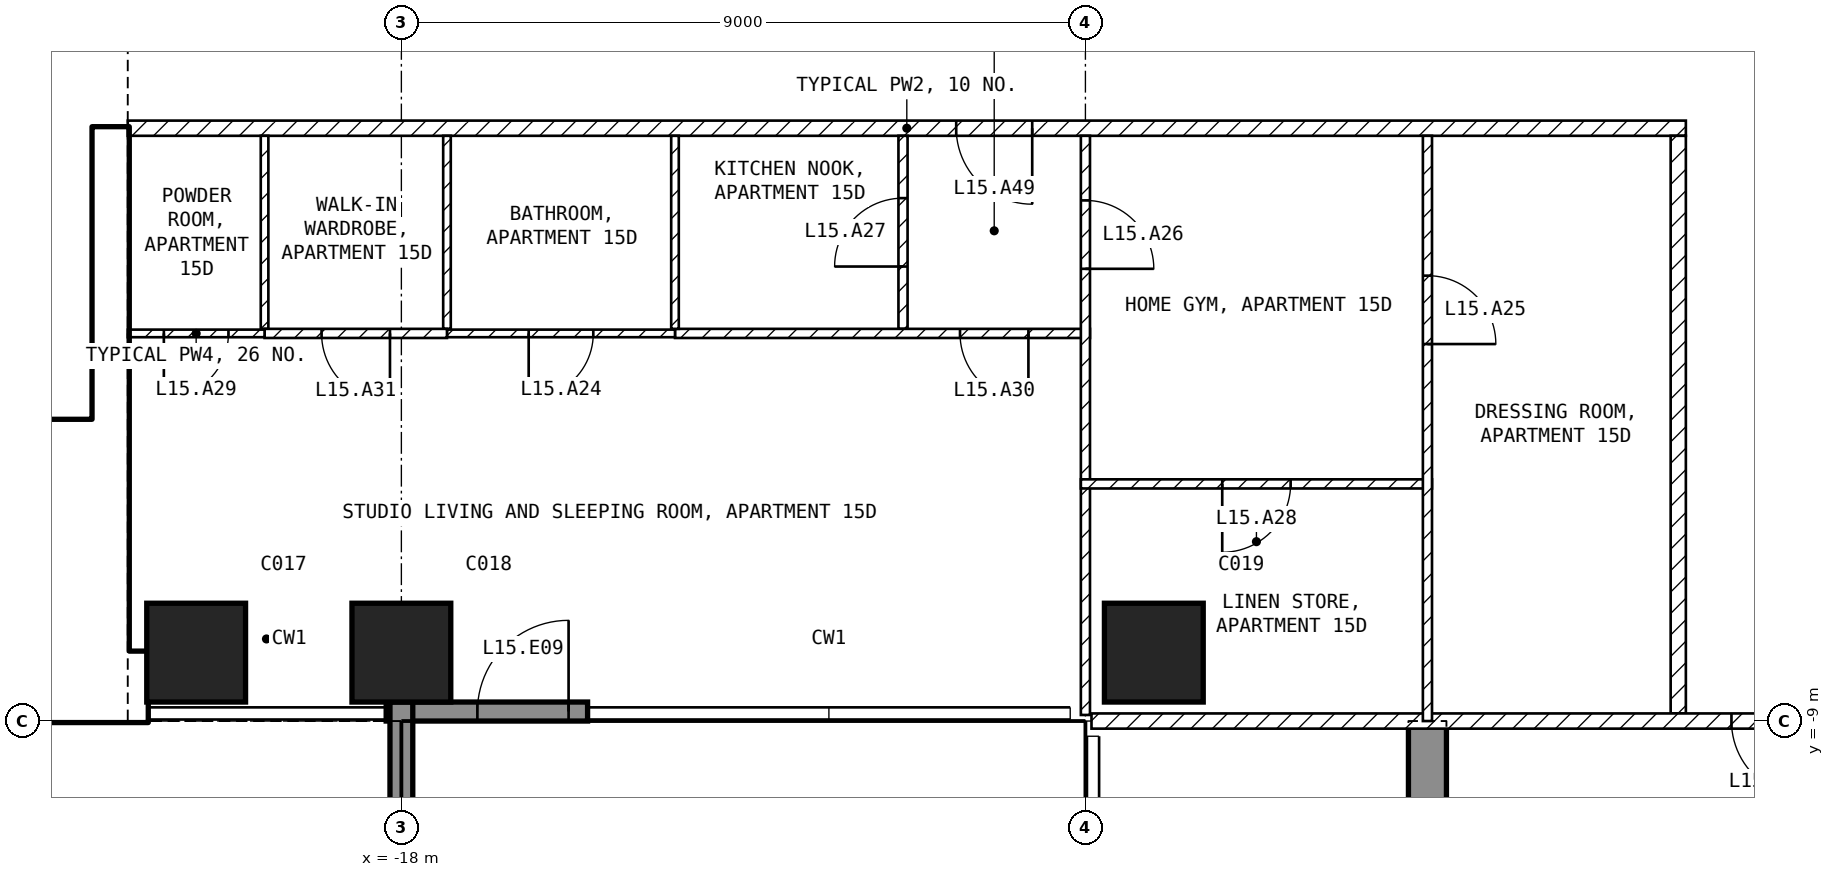
"""IFC4 building model, lengths in metres.
Left out: names, types, materials, properties, quantities, classifications, styles, units other than length and angle.
Written with IfcOpenShell. Run it as: python <this file> out.ifc"""

import sys

from ifc_helpers import new_model, si_unit, direction, frame, frame_2d, origin, origin_2d, place, context, subcontext, project, spatial, polyline, rectangle, outline, extrude, element, fill, save


model = new_model("IFC4")
c1 = context("Model", 3, precision=1e-05, world=origin(), true_north=direction((0.0, 1.0)))
c2 = subcontext(c1, "Body", "Model", "MODEL_VIEW")
j1 = project(units=[si_unit("LENGTHUNIT", "METRE"), si_unit("PLANEANGLEUNIT", "RADIAN")], contexts=[c1])
p1 = place(None, origin())
s1 = spatial("IfcSite", under=j1, at=p1, CompositionType="ELEMENT")
p2 = place(p1, origin())
s2 = spatial("IfcBuilding", under=s1, at=p2, CompositionType="ELEMENT")
p3 = place(p2, frame((0.0, 0.0, 71.5)))
s3 = spatial("IfcBuildingStorey", under=s2, at=p3, CompositionType="ELEMENT", Elevation=71.5)
for number, where, z_axis, x_axis in (
    (1, (-20.7, -8.1, -0.25), (0.0, 0.0, 1.0), (1.0, 0.0, 0.0)),
    (2, (-18.0, -8.1, -0.25), (0.0, 0.0, 1.0), (1.0, 0.0, 0.0)),
    (3, (-8.1, -8.1, -0.25), (0.0, 0.0, 1.0), (1.0, 0.0, 0.0)),
):
    element("IfcColumn", number, at=place(p3, frame(where, z_axis=z_axis, x_axis=x_axis)), inside=s3, PredefinedType="COLUMN", context=c2, shape_type="SweptSolid", body=[
        extrude(rectangle(XDim=1.3, YDim=1.3, at=origin_2d()), origin(), (0.0, 0.0, 1.0), 3.5),
    ])
p4 = place(p3, frame((-4.75, -25.45, -0.25), z_axis=(1.0, 0.0, 0.0), x_axis=(0.0, 1.0, 0.0)))
e4 = element("IfcWall", 4, at=p4, inside=s3, PredefinedType="SHEAR", context=c2, shape_type="SweptSolid", body=[
    extrude(outline(polyline([(0.0, 0.0), (4.15, 0.0), (4.15, 2.65), (6.55, 2.65), (6.55, 0.0), (11.95, 0.0), (11.95, 2.65), (14.35, 2.65), (14.35, 0.0), (16.45, 0.0), (16.45, 3.5), (0.0, 3.5), (0.0, 0.0)])), origin(), (0.0, 0.0, 1.0), 0.5),
])
p5 = place(p3, frame((-18.2, -8.875, 0.0), z_axis=(0.0, 0.0, 1.0), x_axis=(1.0, 0.0, 0.0)))
e5 = element("IfcWall", 5, at=p5, inside=s3, PredefinedType="SOLIDWALL", context=c2, shape_type="SweptSolid", body=[
    extrude(rectangle(XDim=2.65, YDim=0.25, at=frame_2d((1.325, 0.0))), origin(), (0.0, 0.0, 1.0), 3.25),
])
p6 = place(p5, frame((1.2, 0.0, 0.0)))
e6 = element("IfcOpeningElement", 6, at=p6, cuts=e5, PredefinedType="OPENING", context=c2, shape_type="SweptSolid", body=[
    extrude(rectangle(XDim=1.2, YDim=2.4, at=frame_2d((0.6, 1.2))), frame((0.0, 0.135, 0.0), z_axis=(0.0, -1.0, 0.0), x_axis=(1.0, 0.0, 0.0)), (0.0, 0.0, 1.0), 0.27),
])
p7 = place(p3, frame((-18.0, -8.75, 0.0), z_axis=(0.0, 0.0, 1.0), x_axis=(0.0, -1.0, 0.0)))
e7 = element("IfcWall", 7, at=p7, inside=s3, PredefinedType="SOLIDWALL", context=c2, shape_type="SweptSolid", body=[
    extrude(rectangle(XDim=2.95, YDim=0.3, at=frame_2d((1.475, 0.0))), origin(), (0.0, 0.0, 1.0), 3.25),
])
p8 = place(p3, frame((-32.4, -8.55, 0.0), z_axis=(0.0, 0.0, 1.0), x_axis=(1.0, 0.0, 0.0)))
e8 = element("IfcWall", 8, at=p8, inside=s3, PredefinedType="SHEAR", context=c2, shape_type="SweptSolid", body=[
    extrude(rectangle(XDim=11.05, YDim=0.9, at=frame_2d((5.525, 0.0))), origin(), (0.0, 0.0, 1.0), 3.25),
])
p9 = place(p3, frame((-21.825, -8.1, 0.0), z_axis=(0.0, 0.0, 1.0), x_axis=(0.0, 1.0, 0.0)))
e9 = element("IfcWall", 9, at=p9, inside=s3, PredefinedType="SHEAR", context=c2, shape_type="SweptSolid", body=[
    extrude(rectangle(XDim=6.9, YDim=0.45, at=frame_2d((3.45, 0.0))), origin(), (0.0, 0.0, 1.0), 3.25),
])
p10 = place(p3, frame((-28.35, -5.15, 0.0), z_axis=(0.0, 0.0, 1.0), x_axis=(1.0, 0.0, 0.0)))
e10 = element("IfcWall", 10, at=p10, inside=s3, PredefinedType="SOLIDWALL", context=c2, shape_type="SweptSolid", body=[
    extrude(rectangle(XDim=6.3, YDim=0.2, at=frame_2d((3.15, 0.0))), origin(), (0.0, 0.0, 1.0), 3.25),
])
p11 = place(p10, frame((5.1, 0.0, 0.0)))
e11 = element("IfcOpeningElement", 11, at=p11, cuts=e10, PredefinedType="OPENING", context=c2, shape_type="SweptSolid", body=[
    extrude(rectangle(XDim=1.0, YDim=2.1, at=frame_2d((0.5, 1.05))), frame((0.0, 0.11, 0.0), z_axis=(0.0, -1.0, 0.0), x_axis=(1.0, 0.0, 0.0)), (0.0, 0.0, 1.0), 0.22),
])
p12 = place(p3, frame((-1.1, -1.2, 0.0), z_axis=(0.0, 0.0, 1.0), x_axis=(-1.0, 0.0, 0.0)))
e12 = element("IfcWall", 12, at=p12, inside=s3, PredefinedType="PARTITIONING", context=c2, shape_type="SweptSolid", body=[
    extrude(rectangle(XDim=20.5, YDim=0.2, at=frame_2d((10.25, 0.0))), origin(), (0.0, 0.0, 1.0), 3.25),
])
p13 = place(p12, frame((8.6, 0.0, 0.0)))
e13 = element("IfcOpeningElement", 13, at=p13, cuts=e12, PredefinedType="OPENING", context=c2, shape_type="SweptSolid", body=[
    extrude(rectangle(XDim=1.0, YDim=2.1, at=frame_2d((0.5, 1.05))), frame((0.0, 0.11, 0.0), z_axis=(0.0, -1.0, 0.0), x_axis=(1.0, 0.0, 0.0)), (0.0, 0.0, 1.0), 0.22),
])
p14 = place(p3, frame((-1.2, -8.9, 0.0), z_axis=(0.0, 0.0, 1.0), x_axis=(0.0, 1.0, 0.0)))
e14 = element("IfcWall", 14, at=p14, inside=s3, PredefinedType="PARTITIONING", context=c2, shape_type="SweptSolid", body=[
    extrude(rectangle(XDim=7.6, YDim=0.2, at=frame_2d((3.8, 0.0))), origin(), (0.0, 0.0, 1.0), 3.25),
])
p15 = place(p3, frame((8.92, -9.0, 0.0), z_axis=(0.0, 0.0, 1.0), x_axis=(-1.0, 0.0, 0.0)))
e15 = element("IfcWall", 15, at=p15, inside=s3, PredefinedType="PARTITIONING", context=c2, shape_type="SweptSolid", body=[
    extrude(rectangle(XDim=17.84, YDim=0.2, at=frame_2d((8.92, 0.0))), origin(), (0.0, 0.0, 1.0), 3.25),
])
p16 = place(p15, frame((8.42, 0.0, 0.0)))
e16 = element("IfcOpeningElement", 16, at=p16, cuts=e15, PredefinedType="OPENING", context=c2, shape_type="SweptSolid", body=[
    extrude(rectangle(XDim=1.0, YDim=2.1, at=frame_2d((0.5, 1.05))), frame((0.0, 0.11, 0.0), z_axis=(0.0, -1.0, 0.0), x_axis=(1.0, 0.0, 0.0)), (0.0, 0.0, 1.0), 0.22),
])
p17 = place(p3, frame((-11.4, -3.84, 0.0), z_axis=(0.0, 0.0, 1.0), x_axis=(0.0, 1.0, 0.0)))
e17 = element("IfcWall", 17, at=p17, inside=s3, PredefinedType="PARTITIONING", context=c2, shape_type="SweptSolid", body=[
    extrude(rectangle(XDim=2.54, YDim=0.12, at=frame_2d((1.27, 0.0))), origin(), (0.0, 0.0, 1.0), 3.25),
])
p18 = place(p17, frame((0.82, 0.0, 0.0)))
e18 = element("IfcOpeningElement", 18, at=p18, cuts=e17, PredefinedType="OPENING", context=c2, shape_type="SweptSolid", body=[
    extrude(rectangle(XDim=0.9, YDim=2.1, at=frame_2d((0.45, 1.05))), frame((0.0, 0.07, 0.0), z_axis=(0.0, -1.0, 0.0), x_axis=(1.0, 0.0, 0.0)), (0.0, 0.0, 1.0), 0.14),
])
p19 = place(p3, frame((-8.94, -3.9, 0.0), z_axis=(0.0, 0.0, 1.0), x_axis=(-1.0, 0.0, 0.0)))
e19 = element("IfcWall", 19, at=p19, inside=s3, PredefinedType="PARTITIONING", context=c2, shape_type="SweptSolid", body=[
    extrude(rectangle(XDim=5.46, YDim=0.12, at=frame_2d((2.73, 0.0))), origin(), (0.0, 0.0, 1.0), 3.25),
])
p20 = place(p19, frame((0.81, 0.0, 0.0)))
e20 = element("IfcOpeningElement", 20, at=p20, cuts=e19, PredefinedType="OPENING", context=c2, shape_type="SweptSolid", body=[
    extrude(rectangle(XDim=0.9, YDim=2.1, at=frame_2d((0.45, 1.05))), frame((0.0, 0.07, 0.0), z_axis=(0.0, -1.0, 0.0), x_axis=(1.0, 0.0, 0.0)), (0.0, 0.0, 1.0), 0.14),
])
p21 = place(p3, frame((-9.0, -1.3, 0.0), z_axis=(0.0, 0.0, 1.0), x_axis=(0.0, -1.0, 0.0)))
e21 = element("IfcWall", 21, at=p21, inside=s3, PredefinedType="PARTITIONING", context=c2, shape_type="SweptSolid", body=[
    extrude(rectangle(XDim=7.62, YDim=0.12, at=frame_2d((3.81, 0.0))), origin(), (0.0, 0.0, 1.0), 3.25),
])
p22 = place(p21, frame((0.85, 0.0, 0.0)))
e22 = element("IfcOpeningElement", 22, at=p22, cuts=e21, PredefinedType="OPENING", context=c2, shape_type="SweptSolid", body=[
    extrude(rectangle(XDim=0.9, YDim=2.1, at=frame_2d((0.45, 1.05))), frame((0.0, 0.07, 0.0), z_axis=(0.0, -1.0, 0.0), x_axis=(1.0, 0.0, 0.0)), (0.0, 0.0, 1.0), 0.14),
])
for number, where, z_axis, x_axis in (
    (23, (-14.4, -3.84, 0.0), (0.0, 0.0, 1.0), (0.0, 1.0, 0.0)),
    (24, (-17.4, -3.84, 0.0), (0.0, 0.0, 1.0), (0.0, 1.0, 0.0)),
):
    element("IfcWall", number, at=place(p3, frame(where, z_axis=z_axis, x_axis=x_axis)), inside=s3, PredefinedType="PARTITIONING", context=c2, shape_type="SweptSolid", body=[
        extrude(rectangle(XDim=2.54, YDim=0.1, at=frame_2d((1.27, 0.0))), origin(), (0.0, 0.0, 1.0), 3.25),
    ])
p23 = place(p3, frame((-14.4, -3.9, 0.0), z_axis=(0.0, 0.0, 1.0), x_axis=(-1.0, 0.0, 0.0)))
e25 = element("IfcWall", 25, at=p23, inside=s3, PredefinedType="PARTITIONING", context=c2, shape_type="SweptSolid", body=[
    extrude(rectangle(XDim=3.0, YDim=0.1, at=frame_2d((1.5, 0.0))), origin(), (0.0, 0.0, 1.0), 3.25),
])
p24 = place(p23, frame((1.075, 0.0, 0.0)))
e26 = element("IfcOpeningElement", 26, at=p24, cuts=e25, PredefinedType="OPENING", context=c2, shape_type="SweptSolid", body=[
    extrude(rectangle(XDim=0.85, YDim=2.1, at=frame_2d((0.425, 1.05))), frame((0.0, 0.06, 0.0), z_axis=(0.0, -1.0, 0.0), x_axis=(1.0, 0.0, 0.0)), (0.0, 0.0, 1.0), 0.12),
])
p25 = place(p3, frame((-19.8, -3.84, 0.0), z_axis=(0.0, 0.0, 1.0), x_axis=(0.0, 1.0, 0.0)))
e27 = element("IfcWall", 27, at=p25, inside=s3, PredefinedType="PARTITIONING", context=c2, shape_type="SweptSolid", body=[
    extrude(rectangle(XDim=2.54, YDim=0.1, at=frame_2d((1.27, 0.0))), origin(), (0.0, 0.0, 1.0), 3.25),
])
p26 = place(p3, frame((-17.4, -3.9, 0.0), z_axis=(0.0, 0.0, 1.0), x_axis=(-1.0, 0.0, 0.0)))
e28 = element("IfcWall", 28, at=p26, inside=s3, PredefinedType="PARTITIONING", context=c2, shape_type="SweptSolid", body=[
    extrude(rectangle(XDim=2.4, YDim=0.12, at=frame_2d((1.2, 0.0))), origin(), (0.0, 0.0, 1.0), 3.25),
])
p27 = place(p26, frame((0.75, 0.0, 0.0)))
e29 = element("IfcOpeningElement", 29, at=p27, cuts=e28, PredefinedType="OPENING", context=c2, shape_type="SweptSolid", body=[
    extrude(rectangle(XDim=0.9, YDim=2.1, at=frame_2d((0.45, 1.05))), frame((0.0, 0.07, 0.0), z_axis=(0.0, -1.0, 0.0), x_axis=(1.0, 0.0, 0.0)), (0.0, 0.0, 1.0), 0.14),
])
p28 = place(p3, frame((-19.8, -3.9, 0.0), z_axis=(0.0, 0.0, 1.0), x_axis=(-1.0, 0.0, 0.0)))
e30 = element("IfcWall", 30, at=p28, inside=s3, PredefinedType="PARTITIONING", context=c2, shape_type="SweptSolid", body=[
    extrude(rectangle(XDim=1.8, YDim=0.1, at=frame_2d((0.9, 0.0))), origin(), (0.0, 0.0, 1.0), 3.25),
])
p29 = place(p28, frame((0.475, 0.0, 0.0)))
e31 = element("IfcOpeningElement", 31, at=p29, cuts=e30, PredefinedType="OPENING", context=c2, shape_type="SweptSolid", body=[
    extrude(rectangle(XDim=0.85, YDim=2.1, at=frame_2d((0.425, 1.05))), frame((0.0, 0.06, 0.0), z_axis=(0.0, -1.0, 0.0), x_axis=(1.0, 0.0, 0.0)), (0.0, 0.0, 1.0), 0.12),
])
p30 = place(p3, frame((-4.44, -5.88, 0.0), z_axis=(0.0, 0.0, 1.0), x_axis=(-1.0, 0.0, 0.0)))
e32 = element("IfcWall", 32, at=p30, inside=s3, PredefinedType="PARTITIONING", context=c2, shape_type="SweptSolid", body=[
    extrude(rectangle(XDim=4.62, YDim=0.12, at=frame_2d((2.31, 0.0))), origin(), (0.0, 0.0, 1.0), 3.25),
])
p31 = place(p30, frame((1.86, 0.0, 0.0)))
e33 = element("IfcOpeningElement", 33, at=p31, cuts=e32, PredefinedType="OPENING", context=c2, shape_type="SweptSolid", body=[
    extrude(rectangle(XDim=0.9, YDim=2.1, at=frame_2d((0.45, 1.05))), frame((0.0, 0.07, 0.0), z_axis=(0.0, -1.0, 0.0), x_axis=(1.0, 0.0, 0.0)), (0.0, 0.0, 1.0), 0.14),
])
p32 = place(p3, frame((-4.5, -1.3, 0.0), z_axis=(0.0, 0.0, 1.0), x_axis=(0.0, -1.0, 0.0)))
e34 = element("IfcWall", 34, at=p32, inside=s3, PredefinedType="PARTITIONING", context=c2, shape_type="SweptSolid", body=[
    extrude(rectangle(XDim=7.7, YDim=0.12, at=frame_2d((3.85, 0.0))), origin(), (0.0, 0.0, 1.0), 3.25),
])
p33 = place(p32, frame((1.84, 0.0, 0.0)))
e35 = element("IfcOpeningElement", 35, at=p33, cuts=e34, PredefinedType="OPENING", context=c2, shape_type="SweptSolid", body=[
    extrude(rectangle(XDim=0.9, YDim=2.1, at=frame_2d((0.45, 1.05))), frame((0.0, 0.07, 0.0), z_axis=(0.0, -1.0, 0.0), x_axis=(1.0, 0.0, 0.0)), (0.0, 0.0, 1.0), 0.14),
])
p34 = place(p6, origin())
e36 = element("IfcDoor", 36, at=p34, inside=s3, OperationType="SINGLE_SWING_RIGHT", PredefinedType="DOOR", context=c2, shape_type="SweptSolid", body=[
    extrude(rectangle(XDim=1.2, YDim=2.4, at=frame_2d((0.6, 1.2))), frame((0.0, 0.025, 0.0), z_axis=(0.0, -1.0, 0.0), x_axis=(1.0, 0.0, 0.0)), (0.0, 0.0, 1.0), 0.05),
])
fill(e6, e36)
p35 = place(p11, origin())
e37 = element("IfcDoor", 37, at=p35, inside=s3, OperationType="SINGLE_SWING_LEFT", PredefinedType="DOOR", context=c2, shape_type="SweptSolid", body=[
    extrude(rectangle(XDim=1.0, YDim=2.1, at=frame_2d((0.5, 1.05))), frame((0.0, 0.025, 0.0), z_axis=(0.0, -1.0, 0.0), x_axis=(1.0, 0.0, 0.0)), (0.0, 0.0, 1.0), 0.05),
])
fill(e11, e37)
p36 = place(p24, origin())
e38 = element("IfcDoor", 38, at=p36, inside=s3, OperationType="SINGLE_SWING_RIGHT", PredefinedType="DOOR", context=c2, shape_type="SweptSolid", body=[
    extrude(rectangle(XDim=0.85, YDim=2.1, at=frame_2d((0.425, 1.05))), frame((0.0, 0.025, 0.0), z_axis=(0.0, -1.0, 0.0), x_axis=(1.0, 0.0, 0.0)), (0.0, 0.0, 1.0), 0.05),
])
fill(e26, e38)
p37 = place(p33, origin())
e39 = element("IfcDoor", 39, at=p37, inside=s3, OperationType="SINGLE_SWING_RIGHT", PredefinedType="DOOR", context=c2, shape_type="SweptSolid", body=[
    extrude(rectangle(XDim=0.9, YDim=2.1, at=frame_2d((0.45, 1.05))), frame((0.0, 0.025, 0.0), z_axis=(0.0, -1.0, 0.0), x_axis=(1.0, 0.0, 0.0)), (0.0, 0.0, 1.0), 0.05),
])
fill(e35, e39)
p38 = place(p22, origin())
e40 = element("IfcDoor", 40, at=p38, inside=s3, OperationType="SINGLE_SWING_RIGHT", PredefinedType="DOOR", context=c2, shape_type="SweptSolid", body=[
    extrude(rectangle(XDim=0.9, YDim=2.1, at=frame_2d((0.45, 1.05))), frame((0.0, 0.025, 0.0), z_axis=(0.0, -1.0, 0.0), x_axis=(1.0, 0.0, 0.0)), (0.0, 0.0, 1.0), 0.05),
])
fill(e22, e40)
p39 = place(p18, origin())
e41 = element("IfcDoor", 41, at=p39, inside=s3, OperationType="SINGLE_SWING_LEFT", PredefinedType="DOOR", context=c2, shape_type="SweptSolid", body=[
    extrude(rectangle(XDim=0.9, YDim=2.1, at=frame_2d((0.45, 1.05))), frame((0.0, 0.025, 0.0), z_axis=(0.0, -1.0, 0.0), x_axis=(1.0, 0.0, 0.0)), (0.0, 0.0, 1.0), 0.05),
])
fill(e18, e41)
p40 = place(p31, origin())
e42 = element("IfcDoor", 42, at=p40, inside=s3, OperationType="SINGLE_SWING_RIGHT", PredefinedType="DOOR", context=c2, shape_type="SweptSolid", body=[
    extrude(rectangle(XDim=0.9, YDim=2.1, at=frame_2d((0.45, 1.05))), frame((0.0, 0.025, 0.0), z_axis=(0.0, -1.0, 0.0), x_axis=(1.0, 0.0, 0.0)), (0.0, 0.0, 1.0), 0.05),
])
fill(e33, e42)
p41 = place(p29, origin())
e43 = element("IfcDoor", 43, at=p41, inside=s3, OperationType="SINGLE_SWING_RIGHT", PredefinedType="DOOR", context=c2, shape_type="SweptSolid", body=[
    extrude(rectangle(XDim=0.85, YDim=2.1, at=frame_2d((0.425, 1.05))), frame((0.0, 0.025, 0.0), z_axis=(0.0, -1.0, 0.0), x_axis=(1.0, 0.0, 0.0)), (0.0, 0.0, 1.0), 0.05),
])
fill(e31, e43)
p42 = place(p20, origin())
e44 = element("IfcDoor", 44, at=p42, inside=s3, OperationType="SINGLE_SWING_LEFT", PredefinedType="DOOR", context=c2, shape_type="SweptSolid", body=[
    extrude(rectangle(XDim=0.9, YDim=2.1, at=frame_2d((0.45, 1.05))), frame((0.0, 0.025, 0.0), z_axis=(0.0, -1.0, 0.0), x_axis=(1.0, 0.0, 0.0)), (0.0, 0.0, 1.0), 0.05),
])
fill(e20, e44)
p43 = place(p27, origin())
e45 = element("IfcDoor", 45, at=p43, inside=s3, OperationType="SINGLE_SWING_LEFT", PredefinedType="DOOR", context=c2, shape_type="SweptSolid", body=[
    extrude(rectangle(XDim=0.9, YDim=2.1, at=frame_2d((0.45, 1.05))), frame((0.0, 0.025, 0.0), z_axis=(0.0, -1.0, 0.0), x_axis=(1.0, 0.0, 0.0)), (0.0, 0.0, 1.0), 0.05),
])
fill(e29, e45)
p44 = place(p16, origin())
e46 = element("IfcDoor", 46, at=p44, inside=s3, OperationType="SINGLE_SWING_LEFT", PredefinedType="DOOR", context=c2, shape_type="SweptSolid", body=[
    extrude(rectangle(XDim=1.0, YDim=2.1, at=frame_2d((0.5, 1.05))), frame((0.0, 0.025, 0.0), z_axis=(0.0, -1.0, 0.0), x_axis=(1.0, 0.0, 0.0)), (0.0, 0.0, 1.0), 0.05),
])
fill(e16, e46)
p45 = place(p13, origin())
e47 = element("IfcDoor", 47, at=p45, inside=s3, OperationType="SINGLE_SWING_LEFT", PredefinedType="DOOR", context=c2, shape_type="SweptSolid", body=[
    extrude(rectangle(XDim=1.0, YDim=2.1, at=frame_2d((0.5, 1.05))), frame((0.0, 0.025, 0.0), z_axis=(0.0, -1.0, 0.0), x_axis=(1.0, 0.0, 0.0)), (0.0, 0.0, 1.0), 0.05),
])
fill(e13, e47)
save(model, sys.argv[1])
